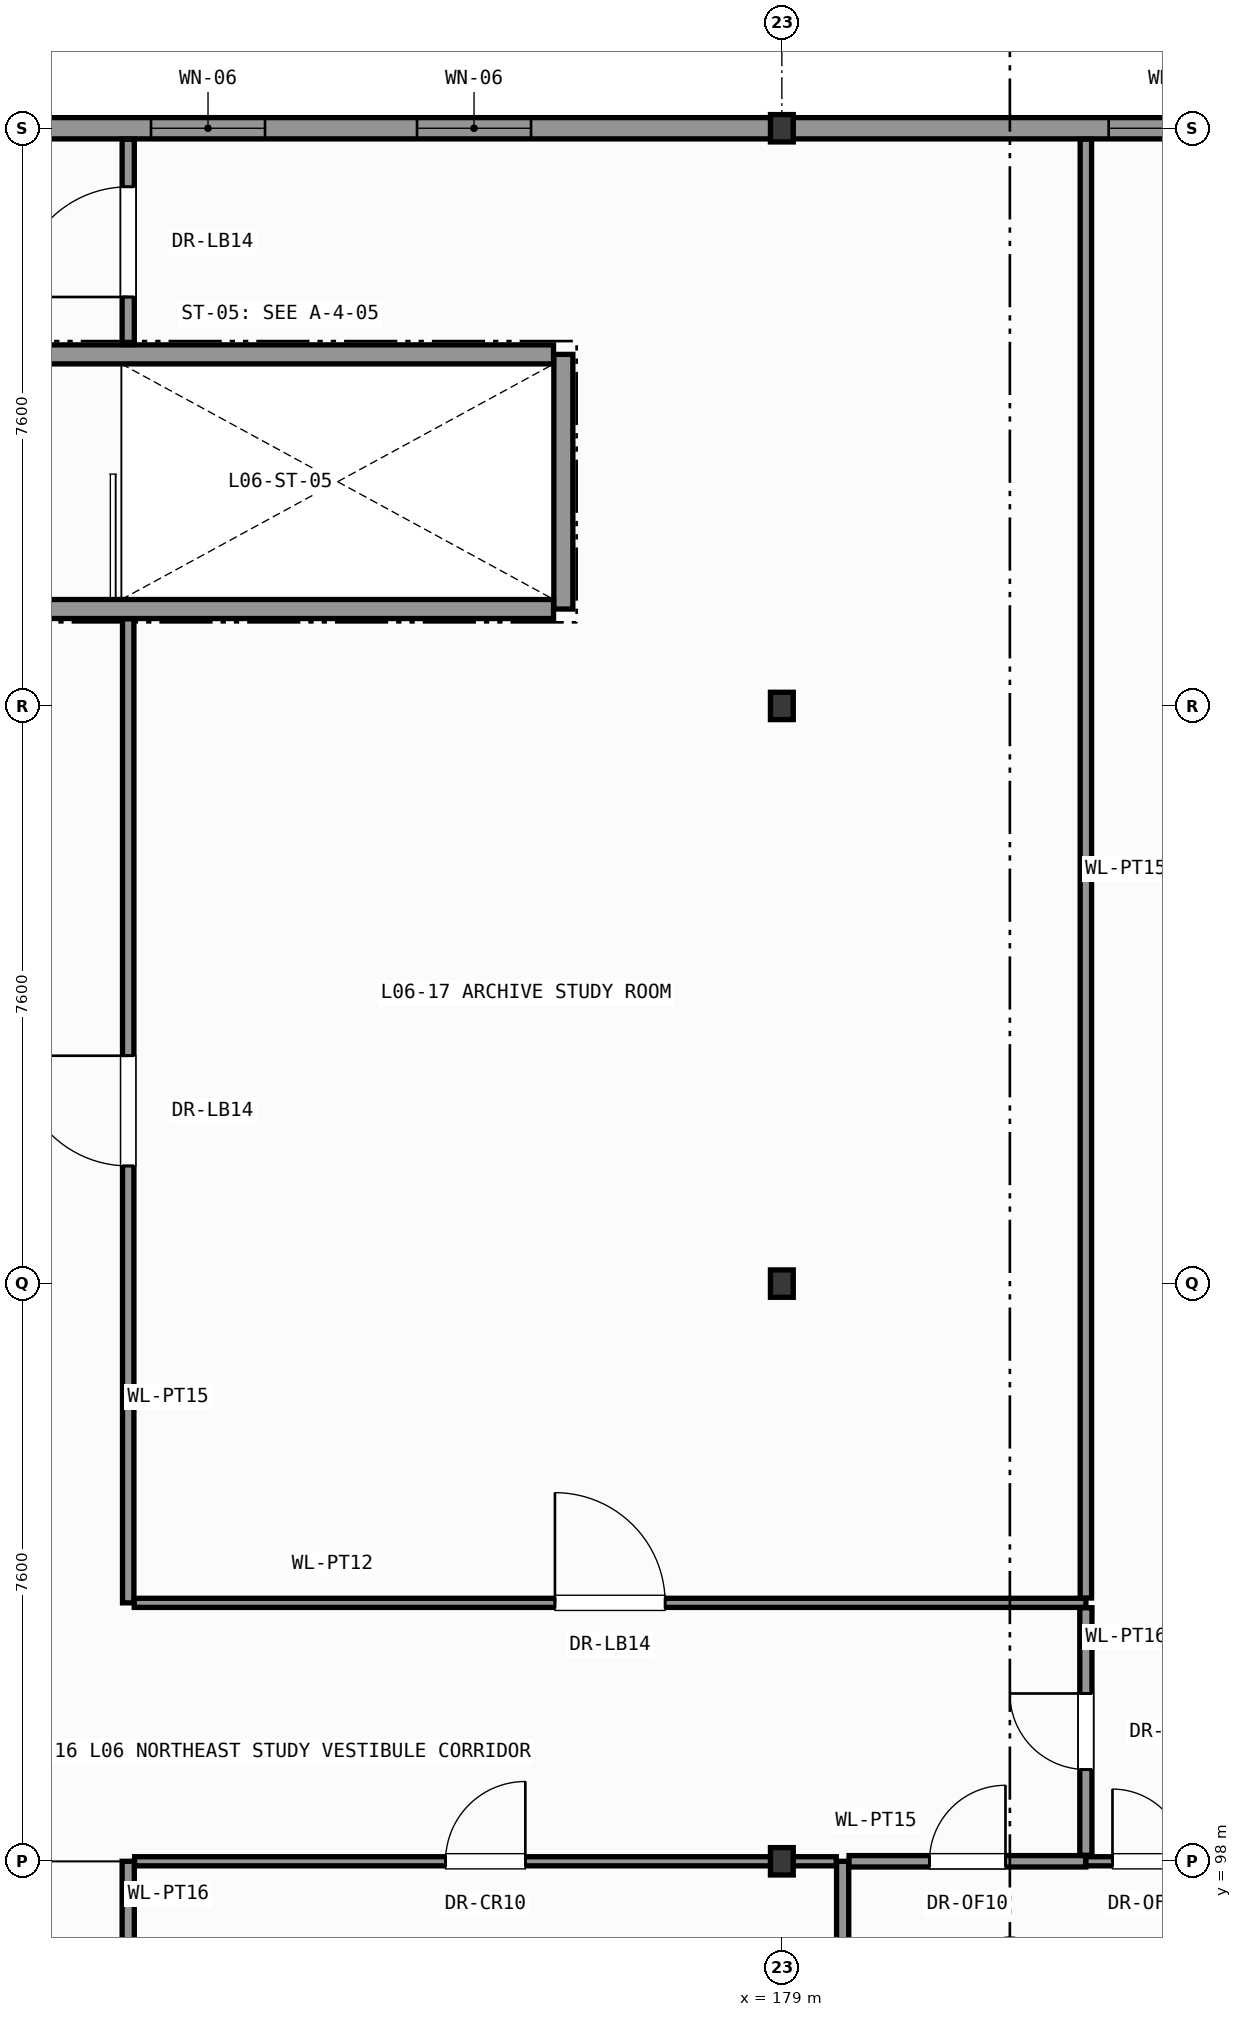
"""IFC4 building model, lengths in metres.
Left out: names, types, materials, properties, quantities, classifications, styles, units other than length and angle.
Written with IfcOpenShell. Run it as: python <this file> out.ifc"""

import sys

from ifc_helpers import new_model, si_unit, direction, frame, frame_2d, origin, origin_2d, place, context, subcontext, project, spatial, rectangle, i_section, extrude, element, fill, save


model = new_model("IFC4")
c1 = context("Model", 3, precision=1e-05, world=origin(), true_north=direction((0.0, 1.0)))
c2 = subcontext(c1, "Body", "Model", "MODEL_VIEW")
j1 = project(units=[si_unit("LENGTHUNIT", "METRE"), si_unit("PLANEANGLEUNIT", "RADIAN")], contexts=[c1])
p1 = place(None, origin())
s1 = spatial("IfcSite", under=j1, at=p1, CompositionType="ELEMENT")
p2 = place(p1, origin())
s2 = spatial("IfcBuilding", under=s1, at=p2, CompositionType="ELEMENT")
p3 = place(p2, frame((0.0, 0.0, 26.4)))
s3 = spatial("IfcBuildingStorey", under=s2, at=p3, CompositionType="ELEMENT", Elevation=26.4)
for number, where, z_axis, x_axis in (
    (1, (179.0, 98.0, 0.0), (0.0, 0.0, 1.0), (1.0, 0.0, 0.0)),
    (2, (179.0, 105.6, 0.0), (0.0, 0.0, 1.0), (1.0, 0.0, 0.0)),
    (3, (179.0, 113.2, 0.0), (0.0, 0.0, 1.0), (1.0, 0.0, 0.0)),
    (4, (179.0, 120.8, 0.0), (0.0, 0.0, 1.0), (1.0, 0.0, 0.0)),
):
    element("IfcColumn", number, at=place(p3, frame(where, z_axis=z_axis, x_axis=x_axis)), inside=s3, PredefinedType="COLUMN", context=c2, shape_type="SweptSolid", body=[
        extrude(i_section(OverallWidth=0.3, OverallDepth=0.36, WebThickness=0.012, FlangeThickness=0.022, FilletRadius=0.027, at=origin_2d()), origin(), (0.0, 0.0, 1.0), 4.2),
    ])
p4 = place(p3, frame((179.0, 120.8, 0.0), z_axis=(0.0, 0.0, 1.0), x_axis=(1.0, 0.0, 0.0)))
e5 = element("IfcWall", 5, at=p4, inside=s3, PredefinedType="SOLIDWALL", context=c2, shape_type="SweptSolid", body=[
    extrude(rectangle(XDim=12.966, YDim=0.28, at=frame_2d((6.483, 0.0))), origin(), (0.0, 0.0, 1.0), 3.435),
])
p5 = place(p4, frame((4.3, 0.0, 0.95)))
e6 = element("IfcOpeningElement", 6, at=p5, cuts=e5, PredefinedType="OPENING", context=c2, shape_type="SweptSolid", body=[
    extrude(rectangle(XDim=1.8, YDim=2.09, at=frame_2d((0.9, 1.045))), frame((0.0, 0.15, 0.0), z_axis=(0.0, -1.0, 0.0), x_axis=(1.0, 0.0, 0.0)), (0.0, 0.0, 1.0), 0.3),
])
p6 = place(p4, frame((7.7, 0.0, 0.95)))
e7 = element("IfcOpeningElement", 7, at=p6, cuts=e5, PredefinedType="OPENING", context=c2, shape_type="SweptSolid", body=[
    extrude(rectangle(XDim=1.8, YDim=2.09, at=frame_2d((0.9, 1.045))), frame((0.0, 0.15, 0.0), z_axis=(0.0, -1.0, 0.0), x_axis=(1.0, 0.0, 0.0)), (0.0, 0.0, 1.0), 0.3),
])
p7 = place(p3, frame((167.0, 120.8, 0.0), z_axis=(0.0, 0.0, 1.0), x_axis=(1.0, 0.0, 0.0)))
e8 = element("IfcWall", 8, at=p7, inside=s3, PredefinedType="SOLIDWALL", context=c2, shape_type="SweptSolid", body=[
    extrude(rectangle(XDim=12.0, YDim=0.28, at=frame_2d((6.0, 0.0))), origin(), (0.0, 0.0, 1.0), 3.435),
])
p8 = place(p7, frame((3.7, 0.0, 0.95)))
e9 = element("IfcOpeningElement", 9, at=p8, cuts=e8, PredefinedType="OPENING", context=c2, shape_type="SweptSolid", body=[
    extrude(rectangle(XDim=1.5, YDim=2.09, at=frame_2d((0.75, 1.045))), frame((0.0, 0.15, 0.0), z_axis=(0.0, -1.0, 0.0), x_axis=(1.0, 0.0, 0.0)), (0.0, 0.0, 1.0), 0.3),
])
p9 = place(p7, frame((7.2, 0.0, 0.95)))
e10 = element("IfcOpeningElement", 10, at=p9, cuts=e8, PredefinedType="OPENING", context=c2, shape_type="SweptSolid", body=[
    extrude(rectangle(XDim=1.5, YDim=2.09, at=frame_2d((0.75, 1.045))), frame((0.0, 0.15, 0.0), z_axis=(0.0, -1.0, 0.0), x_axis=(1.0, 0.0, 0.0)), (0.0, 0.0, 1.0), 0.3),
])
p10 = place(p3, frame((176.125, 114.475, 0.0), z_axis=(0.0, 0.0, 1.0), x_axis=(0.0, 1.0, 0.0)))
e11 = element("IfcWall", 11, at=p10, inside=s3, PredefinedType="SHEAR", context=c2, shape_type="SweptSolid", body=[
    extrude(rectangle(XDim=3.35, YDim=0.25, at=frame_2d((1.675, 0.0))), origin(), (0.0, 0.0, 1.0), 4.0),
])
for number, where, z_axis, x_axis in (
    (12, (168.804, 114.475, 0.0), (0.0, 0.0, 1.0), (1.0, 0.0, 0.0)),
    (13, (168.804, 117.825, 0.0), (0.0, 0.0, 1.0), (1.0, 0.0, 0.0)),
):
    element("IfcWall", number, at=place(p3, frame(where, z_axis=z_axis, x_axis=x_axis)), inside=s3, PredefinedType="SHEAR", context=c2, shape_type="SweptSolid", body=[
        extrude(rectangle(XDim=7.192, YDim=0.25, at=frame_2d((3.596, 0.0))), origin(), (0.0, 0.0, 1.0), 4.0),
    ])
p11 = place(p3, frame((170.4, 94.6, 0.0), z_axis=(0.0, 0.0, 1.0), x_axis=(0.0, 1.0, 0.0)))
e14 = element("IfcWall", 14, at=p11, inside=s3, PredefinedType="PARTITIONING", context=c2, shape_type="SweptSolid", body=[
    extrude(rectangle(XDim=3.4, YDim=0.16, at=frame_2d((1.7, 0.0))), origin(), (0.0, 0.0, 1.0), 4.0),
])
p12 = place(p11, frame((1.175, 0.0, 0.0)))
e15 = element("IfcOpeningElement", 15, at=p12, cuts=e14, PredefinedType="OPENING", context=c2, shape_type="SweptSolid", body=[
    extrude(rectangle(XDim=1.05, YDim=2.2, at=frame_2d((0.525, 1.1))), frame((0.0, 0.09, 0.0), z_axis=(0.0, -1.0, 0.0), x_axis=(1.0, 0.0, 0.0)), (0.0, 0.0, 1.0), 0.18),
])
p13 = place(p3, frame((179.8, 94.6, 0.0), z_axis=(0.0, 0.0, 1.0), x_axis=(0.0, 1.0, 0.0)))
e16 = element("IfcWall", 16, at=p13, inside=s3, PredefinedType="PARTITIONING", context=c2, shape_type="SweptSolid", body=[
    extrude(rectangle(XDim=3.4, YDim=0.16, at=frame_2d((1.7, 0.0))), origin(), (0.0, 0.0, 1.0), 4.0),
])
p14 = place(p3, frame((179.884, 98.0, 0.0), z_axis=(0.0, 0.0, 1.0), x_axis=(1.0, 0.0, 0.0)))
e17 = element("IfcWall", 17, at=p14, inside=s3, PredefinedType="PARTITIONING", context=c2, shape_type="SweptSolid", body=[
    extrude(rectangle(XDim=3.116, YDim=0.15, at=frame_2d((1.558, 0.0))), origin(), (0.0, 0.0, 1.0), 3.435),
])
p15 = place(p14, frame((1.058, 0.0, 0.0)))
e18 = element("IfcOpeningElement", 18, at=p15, cuts=e17, PredefinedType="OPENING", context=c2, shape_type="SweptSolid", body=[
    extrude(rectangle(XDim=1.0, YDim=2.15, at=frame_2d((0.5, 1.075))), frame((0.0, 0.085, 0.0), z_axis=(0.0, -1.0, 0.0), x_axis=(1.0, 0.0, 0.0)), (0.0, 0.0, 1.0), 0.17),
])
p16 = place(p3, frame((183.0, 98.0, 0.0), z_axis=(0.0, 0.0, 1.0), x_axis=(1.0, 0.0, 0.0)))
e19 = element("IfcWall", 19, at=p16, inside=s3, PredefinedType="PARTITIONING", context=c2, shape_type="SweptSolid", body=[
    extrude(rectangle(XDim=14.821, YDim=0.12, at=frame_2d((7.411, 0.0))), origin(), (0.0, 0.0, 1.0), 3.335),
])
p17 = place(p16, frame((0.35, 0.0, 0.0)))
e20 = element("IfcOpeningElement", 20, at=p17, cuts=e19, PredefinedType="OPENING", context=c2, shape_type="SweptSolid", body=[
    extrude(rectangle(XDim=0.95, YDim=2.1, at=frame_2d((0.475, 1.05))), frame((0.0, 0.07, 0.0), z_axis=(0.0, -1.0, 0.0), x_axis=(1.0, 0.0, 0.0)), (0.0, 0.0, 1.0), 0.14),
])
p18 = place(p3, frame((170.484, 98.0, 0.0), z_axis=(0.0, 0.0, 1.0), x_axis=(1.0, 0.0, 0.0)))
e21 = element("IfcWall", 21, at=p18, inside=s3, PredefinedType="PARTITIONING", context=c2, shape_type="SweptSolid", body=[
    extrude(rectangle(XDim=9.232, YDim=0.12, at=frame_2d((4.616, 0.0))), origin(), (0.0, 0.0, 1.0), 3.435),
])
p19 = place(p18, frame((4.091, 0.0, 0.0)))
e22 = element("IfcOpeningElement", 22, at=p19, cuts=e21, PredefinedType="OPENING", context=c2, shape_type="SweptSolid", body=[
    extrude(rectangle(XDim=1.05, YDim=2.2, at=frame_2d((0.525, 1.1))), frame((0.0, 0.07, 0.0), z_axis=(0.0, -1.0, 0.0), x_axis=(1.0, 0.0, 0.0)), (0.0, 0.0, 1.0), 0.14),
])
p20 = place(p3, frame((170.4, 117.954, 0.0), z_axis=(0.0, 0.0, 1.0), x_axis=(0.0, 1.0, 0.0)))
e23 = element("IfcWall", 23, at=p20, inside=s3, PredefinedType="PARTITIONING", context=c2, shape_type="SweptSolid", body=[
    extrude(rectangle(XDim=2.702, YDim=0.16, at=frame_2d((1.351, 0.0))), origin(), (0.0, 0.0, 1.0), 4.0),
])
p21 = place(p20, frame((0.626, 0.0, 0.0)))
e24 = element("IfcOpeningElement", 24, at=p21, cuts=e23, PredefinedType="OPENING", context=c2, shape_type="SweptSolid", body=[
    extrude(rectangle(XDim=1.45, YDim=2.35, at=frame_2d((0.725, 1.175))), frame((0.0, 0.09, 0.0), z_axis=(0.0, -1.0, 0.0), x_axis=(1.0, 0.0, 0.0)), (0.0, 0.0, 1.0), 0.18),
])
p22 = place(p3, frame((170.4, 101.4, 0.0), z_axis=(0.0, 0.0, 1.0), x_axis=(0.0, 1.0, 0.0)))
e25 = element("IfcWall", 25, at=p22, inside=s3, PredefinedType="PARTITIONING", context=c2, shape_type="SweptSolid", body=[
    extrude(rectangle(XDim=12.946, YDim=0.15, at=frame_2d((6.473, 0.0))), origin(), (0.0, 0.0, 1.0), 4.0),
])
p23 = place(p22, frame((5.748, 0.0, 0.0)))
e26 = element("IfcOpeningElement", 26, at=p23, cuts=e25, PredefinedType="OPENING", context=c2, shape_type="SweptSolid", body=[
    extrude(rectangle(XDim=1.45, YDim=2.35, at=frame_2d((0.725, 1.175))), frame((0.0, 0.085, 0.0), z_axis=(0.0, -1.0, 0.0), x_axis=(1.0, 0.0, 0.0)), (0.0, 0.0, 1.0), 0.17),
])
p24 = place(p3, frame((170.479, 101.4, 0.0), z_axis=(0.0, 0.0, 1.0), x_axis=(1.0, 0.0, 0.0)))
e27 = element("IfcWall", 27, at=p24, inside=s3, PredefinedType="PARTITIONING", context=c2, shape_type="SweptSolid", body=[
    extrude(rectangle(XDim=12.521, YDim=0.12, at=frame_2d((6.26, 0.0))), origin(), (0.0, 0.0, 1.0), 4.0),
])
p25 = place(p24, frame((5.535, 0.0, 0.0)))
e28 = element("IfcOpeningElement", 28, at=p25, cuts=e27, PredefinedType="OPENING", context=c2, shape_type="SweptSolid", body=[
    extrude(rectangle(XDim=1.45, YDim=2.35, at=frame_2d((0.725, 1.175))), frame((0.0, 0.07, 0.0), z_axis=(0.0, -1.0, 0.0), x_axis=(1.0, 0.0, 0.0)), (0.0, 0.0, 1.0), 0.14),
])
p26 = place(p3, frame((183.0, 98.079, 0.0), z_axis=(0.0, 0.0, 1.0), x_axis=(0.0, 1.0, 0.0)))
e29 = element("IfcWall", 29, at=p26, inside=s3, PredefinedType="PARTITIONING", context=c2, shape_type="SweptSolid", body=[
    extrude(rectangle(XDim=3.257, YDim=0.16, at=frame_2d((1.628, 0.0))), origin(), (0.0, 0.0, 1.0), 4.0),
])
p27 = place(p26, frame((1.128, 0.0, 0.0)))
e30 = element("IfcOpeningElement", 30, at=p27, cuts=e29, PredefinedType="OPENING", context=c2, shape_type="SweptSolid", body=[
    extrude(rectangle(XDim=1.0, YDim=2.15, at=frame_2d((0.5, 1.075))), frame((0.0, 0.09, 0.0), z_axis=(0.0, -1.0, 0.0), x_axis=(1.0, 0.0, 0.0)), (0.0, 0.0, 1.0), 0.18),
])
p28 = place(p3, frame((183.0, 101.464, 0.0), z_axis=(0.0, 0.0, 1.0), x_axis=(0.0, 1.0, 0.0)))
e31 = element("IfcWall", 31, at=p28, inside=s3, PredefinedType="PARTITIONING", context=c2, shape_type="SweptSolid", body=[
    extrude(rectangle(XDim=19.192, YDim=0.15, at=frame_2d((9.596, 0.0))), origin(), (0.0, 0.0, 1.0), 4.0),
])
p29 = place(p5, origin())
e32 = element("IfcWindow", 32, at=p29, inside=s3, PartitioningType="SINGLE_PANEL", PredefinedType="WINDOW", context=c2, shape_type="SweptSolid", body=[
    extrude(rectangle(XDim=1.8, YDim=2.09, at=frame_2d((0.9, 1.045))), frame((0.0, 0.03, 0.0), z_axis=(0.0, -1.0, 0.0), x_axis=(1.0, 0.0, 0.0)), (0.0, 0.0, 1.0), 0.06),
])
fill(e6, e32)
p30 = place(p8, origin())
e33 = element("IfcWindow", 33, at=p30, inside=s3, PartitioningType="SINGLE_PANEL", PredefinedType="WINDOW", context=c2, shape_type="SweptSolid", body=[
    extrude(rectangle(XDim=1.5, YDim=2.09, at=frame_2d((0.75, 1.045))), frame((0.0, 0.03, 0.0), z_axis=(0.0, -1.0, 0.0), x_axis=(1.0, 0.0, 0.0)), (0.0, 0.0, 1.0), 0.06),
])
fill(e9, e33)
p31 = place(p9, origin())
e34 = element("IfcWindow", 34, at=p31, inside=s3, PartitioningType="SINGLE_PANEL", PredefinedType="WINDOW", context=c2, shape_type="SweptSolid", body=[
    extrude(rectangle(XDim=1.5, YDim=2.09, at=frame_2d((0.75, 1.045))), frame((0.0, 0.03, 0.0), z_axis=(0.0, -1.0, 0.0), x_axis=(1.0, 0.0, 0.0)), (0.0, 0.0, 1.0), 0.06),
])
fill(e10, e34)
p32 = place(p15, origin())
e35 = element("IfcDoor", 35, at=p32, inside=s3, OperationType="SINGLE_SWING_RIGHT", PredefinedType="DOOR", context=c2, shape_type="SweptSolid", body=[
    extrude(rectangle(XDim=1.0, YDim=2.15, at=frame_2d((0.5, 1.075))), frame((0.0, 0.025, 0.0), z_axis=(0.0, -1.0, 0.0), x_axis=(1.0, 0.0, 0.0)), (0.0, 0.0, 1.0), 0.05),
])
fill(e18, e35)
p33 = place(p17, origin())
e36 = element("IfcDoor", 36, at=p33, inside=s3, OperationType="SINGLE_SWING_LEFT", PredefinedType="DOOR", context=c2, shape_type="SweptSolid", body=[
    extrude(rectangle(XDim=0.95, YDim=2.1, at=frame_2d((0.475, 1.05))), frame((0.0, 0.025, 0.0), z_axis=(0.0, -1.0, 0.0), x_axis=(1.0, 0.0, 0.0)), (0.0, 0.0, 1.0), 0.05),
])
fill(e20, e36)
p34 = place(p19, origin())
e37 = element("IfcDoor", 37, at=p34, inside=s3, OperationType="SINGLE_SWING_RIGHT", PredefinedType="DOOR", context=c2, shape_type="SweptSolid", body=[
    extrude(rectangle(XDim=1.05, YDim=2.2, at=frame_2d((0.525, 1.1))), frame((0.0, 0.025, 0.0), z_axis=(0.0, -1.0, 0.0), x_axis=(1.0, 0.0, 0.0)), (0.0, 0.0, 1.0), 0.05),
])
fill(e22, e37)
p35 = place(p21, origin())
e38 = element("IfcDoor", 38, at=p35, inside=s3, OperationType="SINGLE_SWING_LEFT", PredefinedType="DOOR", context=c2, shape_type="SweptSolid", body=[
    extrude(rectangle(XDim=1.45, YDim=2.35, at=frame_2d((0.725, 1.175))), frame((0.0, 0.025, 0.0), z_axis=(0.0, -1.0, 0.0), x_axis=(1.0, 0.0, 0.0)), (0.0, 0.0, 1.0), 0.05),
])
fill(e24, e38)
p36 = place(p23, origin())
e39 = element("IfcDoor", 39, at=p36, inside=s3, OperationType="SINGLE_SWING_RIGHT", PredefinedType="DOOR", context=c2, shape_type="SweptSolid", body=[
    extrude(rectangle(XDim=1.45, YDim=2.35, at=frame_2d((0.725, 1.175))), frame((0.0, 0.025, 0.0), z_axis=(0.0, -1.0, 0.0), x_axis=(1.0, 0.0, 0.0)), (0.0, 0.0, 1.0), 0.05),
])
fill(e26, e39)
p37 = place(p25, origin())
e40 = element("IfcDoor", 40, at=p37, inside=s3, OperationType="SINGLE_SWING_LEFT", PredefinedType="DOOR", context=c2, shape_type="SweptSolid", body=[
    extrude(rectangle(XDim=1.45, YDim=2.35, at=frame_2d((0.725, 1.175))), frame((0.0, 0.025, 0.0), z_axis=(0.0, -1.0, 0.0), x_axis=(1.0, 0.0, 0.0)), (0.0, 0.0, 1.0), 0.05),
])
fill(e28, e40)
p38 = place(p27, origin())
e41 = element("IfcDoor", 41, at=p38, inside=s3, OperationType="SINGLE_SWING_RIGHT", PredefinedType="DOOR", context=c2, shape_type="SweptSolid", body=[
    extrude(rectangle(XDim=1.0, YDim=2.15, at=frame_2d((0.5, 1.075))), frame((0.0, 0.025, 0.0), z_axis=(0.0, -1.0, 0.0), x_axis=(1.0, 0.0, 0.0)), (0.0, 0.0, 1.0), 0.05),
])
fill(e30, e41)
save(model, sys.argv[1])
